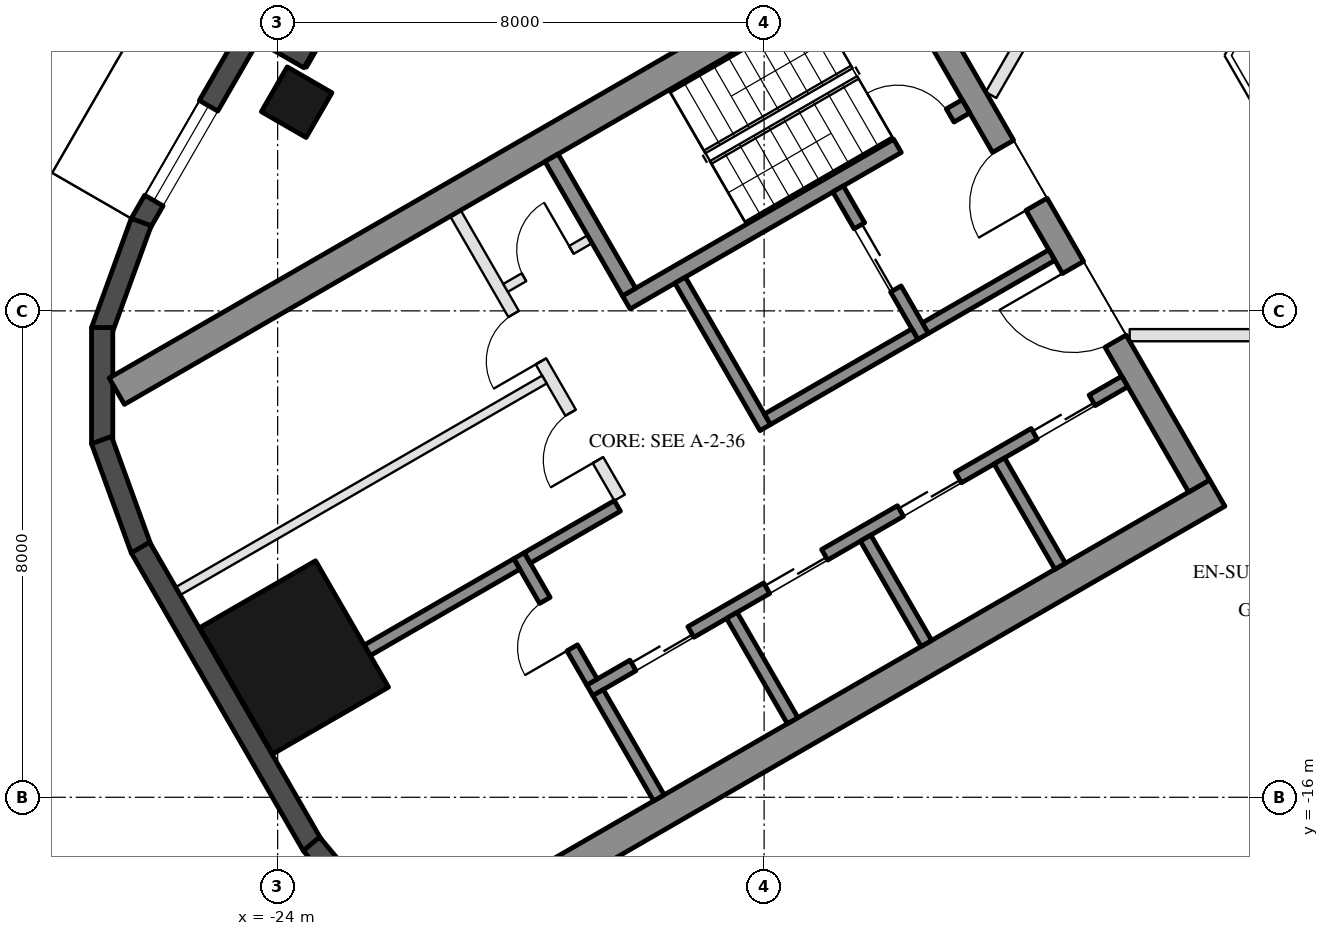
"""IFC4 building model, lengths in metres.
Left out: names, types, materials, properties, quantities, classifications, styles, units other than length and angle.
Written with IfcOpenShell. Run it as: python <this file> out.ifc"""

import sys

from ifc_helpers import new_model, si_unit, direction, frame, frame_2d, origin, origin_2d, place, context, subcontext, project, spatial, rectangle, hollow_rectangle, extrude, element, fill, save


model = new_model("IFC4")
c1 = context("Model", 3, precision=1e-05, world=origin(), true_north=direction((0.0, 1.0)))
c2 = subcontext(c1, "Body", "Model", "MODEL_VIEW")
j1 = project(units=[si_unit("LENGTHUNIT", "METRE"), si_unit("PLANEANGLEUNIT", "RADIAN")], contexts=[c1])
p1 = place(None, origin())
s1 = spatial("IfcSite", under=j1, at=p1, CompositionType="ELEMENT")
p2 = place(p1, origin())
s2 = spatial("IfcBuilding", under=s1, at=p2, CompositionType="ELEMENT")
p3 = place(p2, frame((0.0, 0.0, 157.7)))
s3 = spatial("IfcBuildingStorey", under=s2, at=p3, CompositionType="ELEMENT", Elevation=157.7)
p4 = place(p3, frame((-23.688, -4.568, 0.0), z_axis=(0.0, 0.0, 1.0), x_axis=(0.5, 0.866025403784, 0.0)))
e1 = element("IfcColumn", 1, at=p4, inside=s3, PredefinedType="COLUMN", context=c2, shape_type="SweptSolid", body=[
    extrude(hollow_rectangle(XDim=0.85, YDim=0.85, WallThickness=0.04, at=origin_2d()), origin(), (0.0, 0.0, 1.0), 3.7),
])
p5 = place(p3, frame((-23.729, -13.7, 0.0), z_axis=(0.0, 0.0, 1.0), x_axis=(-0.5, 0.866025403784, 0.0)))
e2 = element("IfcColumn", 2, at=p5, inside=s3, PredefinedType="COLUMN", context=c2, shape_type="SweptSolid", body=[
    extrude(hollow_rectangle(XDim=2.4, YDim=2.2, WallThickness=0.06, at=origin_2d()), origin(), (0.0, 0.0, 1.0), 3.7),
])
p6 = place(p3, frame((-20.309, 1.934, 0.0), z_axis=(0.0, 0.0, 1.0), x_axis=(-0.499992114976, -0.866029956157, 0.0)))
e3 = element("IfcWall", 3, at=p6, inside=s3, PredefinedType="SOLIDWALL", context=c2, shape_type="SweptSolid", body=[
    extrude(rectangle(XDim=6.74, YDim=0.35, at=frame_2d((3.37, 0.0))), origin(), (0.0, 0.0, 1.0), 3.55),
])
p7 = place(p6, frame((0.77, 0.0, 0.0)))
e4 = element("IfcOpeningElement", 4, at=p7, cuts=e3, PredefinedType="OPENING", context=c2, shape_type="SweptSolid", body=[
    extrude(rectangle(XDim=2.4, YDim=2.4, at=frame_2d((1.2, 1.2))), frame((0.0, 0.185, 0.0), z_axis=(0.0, -1.0, 0.0), x_axis=(1.0, 0.0, 0.0)), (0.0, 0.0, 1.0), 0.37),
])
p8 = place(p6, frame((3.47, 0.0, 0.3)))
e5 = element("IfcOpeningElement", 5, at=p8, cuts=e3, PredefinedType="OPENING", context=c2, shape_type="SweptSolid", body=[
    extrude(rectangle(XDim=2.9, YDim=2.65, at=frame_2d((1.45, 1.325))), frame((0.0, 0.185, 0.0), z_axis=(0.0, -1.0, 0.0), x_axis=(1.0, 0.0, 0.0)), (0.0, 0.0, 1.0), 0.37),
])
p9 = place(p3, frame((-23.481, -3.85, 0.0), z_axis=(0.0, 0.0, 1.0), x_axis=(-0.866092288191, 0.499884134912, 0.0)))
e6 = element("IfcWall", 6, at=p9, inside=s3, PredefinedType="SOLIDWALL", context=c2, shape_type="SweptSolid", body=[
    extrude(rectangle(XDim=1.22, YDim=0.35, at=frame_2d((0.61, 0.0))), origin(), (0.0, 0.0, 1.0), 3.55),
])
p10 = place(p3, frame((-24.299, -3.176, 0.0), z_axis=(0.0, 0.0, 1.0), x_axis=(-0.500028278809, -0.866009076391, 0.0)))
e7 = element("IfcWall", 7, at=p10, inside=s3, PredefinedType="SOLIDWALL", context=c2, shape_type="SweptSolid", body=[
    extrude(rectangle(XDim=3.916, YDim=0.35, at=frame_2d((1.958, 0.0))), origin(), (0.0, 0.0, 1.0), 3.55),
])
p11 = place(p10, frame((1.675, 0.0, 0.3)))
e8 = element("IfcOpeningElement", 8, at=p11, cuts=e7, PredefinedType="OPENING", context=c2, shape_type="SweptSolid", body=[
    extrude(rectangle(XDim=1.8, YDim=2.65, at=frame_2d((0.9, 1.325))), frame((0.0, 0.185, 0.0), z_axis=(0.0, -1.0, 0.0), x_axis=(1.0, 0.0, 0.0)), (0.0, 0.0, 1.0), 0.37),
])
for number, where, z_axis, x_axis in (
    (9, (-26.244, -6.54, 0.0), (0.0, 0.0, 1.0), (-0.342, -0.94, 0.0)),
    (10, (-26.886, -8.275, 0.0), (0.0, 0.0, 1.0), (0.0, -1.0, 0.0)),
    (11, (-26.897, -10.125, 0.0), (0.0, 0.0, 1.0), (0.342, -0.94, 0.0)),
):
    element("IfcWall", number, at=place(p3, frame(where, z_axis=z_axis, x_axis=x_axis)), inside=s3, PredefinedType="SOLIDWALL", context=c2, shape_type="SweptSolid", body=[
        extrude(rectangle(XDim=1.91, YDim=0.35, at=frame_2d((0.955, 0.0))), origin(), (0.0, 0.0, 1.0), 3.55),
    ])
p12 = place(p3, frame((-26.257, -11.893, 0.0), z_axis=(0.0, 0.0, 1.0), x_axis=(0.500018773155, -0.866014564827, 0.0)))
e12 = element("IfcWall", 12, at=p12, inside=s3, PredefinedType="SOLIDWALL", context=c2, shape_type="SweptSolid", body=[
    extrude(rectangle(XDim=5.658, YDim=0.35, at=frame_2d((2.829, 0.0))), origin(), (0.0, 0.0, 1.0), 3.55),
])
p13 = place(p3, frame((-23.445, -16.768, 0.0), z_axis=(0.0, 0.0, 1.0), x_axis=(0.642733291068, -0.76609001857, 0.0)))
e13 = element("IfcWall", 13, at=p13, inside=s3, PredefinedType="SOLIDWALL", context=c2, shape_type="SweptSolid", body=[
    extrude(rectangle(XDim=1.91, YDim=0.35, at=frame_2d((0.955, 0.0))), origin(), (0.0, 0.0, 1.0), 3.55),
])
for number, where, z_axis, x_axis in (
    (14, (-13.797, -1.903, 0.0), (0.0, 0.0, 1.0), (-0.866, -0.5, 0.0)),
    (15, (-8.547, -10.997, 0.0), (0.0, 0.0, 1.0), (-0.866, -0.5, 0.0)),
):
    element("IfcWall", number, at=place(p3, frame(where, z_axis=z_axis, x_axis=x_axis)), inside=s3, PredefinedType="SHEAR", context=c2, shape_type="SweptSolid", body=[
        extrude(rectangle(XDim=14.837, YDim=0.5, at=frame_2d((7.418, 0.0))), origin(), (0.0, 0.0, 1.0), 3.5),
    ])
p14 = place(p3, frame((-13.845, -2.22, 0.0), z_axis=(0.0, 0.0, 1.0), x_axis=(0.500004234368, -0.866022959057, 0.0)))
e16 = element("IfcWall", 16, at=p14, inside=s3, PredefinedType="SHEAR", context=c2, shape_type="SweptSolid", body=[
    extrude(rectangle(XDim=10.0, YDim=0.4, at=frame_2d((5.0, 0.0))), origin(), (0.0, 0.0, 1.0), 3.5),
])
p15 = place(p14, frame((3.55, 0.0, 0.0)))
e17 = element("IfcOpeningElement", 17, at=p15, cuts=e16, PredefinedType="OPENING", context=c2, shape_type="SweptSolid", body=[
    extrude(rectangle(XDim=1.1, YDim=2.1, at=frame_2d((0.55, 1.05))), frame((0.0, 0.21, 0.0), z_axis=(0.0, -1.0, 0.0), x_axis=(1.0, 0.0, 0.0)), (0.0, 0.0, 1.0), 0.42),
])
p16 = place(p14, frame((5.85, 0.0, 0.0)))
e18 = element("IfcOpeningElement", 18, at=p16, cuts=e16, PredefinedType="OPENING", context=c2, shape_type="SweptSolid", body=[
    extrude(rectangle(XDim=1.4, YDim=2.1, at=frame_2d((0.7, 1.05))), frame((0.0, 0.21, 0.0), z_axis=(0.0, -1.0, 0.0), x_axis=(1.0, 0.0, 0.0)), (0.0, 0.0, 1.0), 0.42),
])
p17 = place(p3, frame((-12.681, -4.636, 0.0), z_axis=(0.0, 0.0, 1.0), x_axis=(-0.866021702275, -0.500006411147, 0.0)))
e19 = element("IfcWall", 19, at=p17, inside=s3, PredefinedType="SHEAR", context=c2, shape_type="SweptSolid", body=[
    extrude(rectangle(XDim=6.45, YDim=0.25, at=frame_2d((3.225, 0.0))), origin(), (0.0, 0.0, 1.0), 3.5),
])
p18 = place(p17, frame((0.3, 0.0, 0.0)))
e20 = element("IfcOpeningElement", 20, at=p18, cuts=e19, PredefinedType="OPENING", context=c2, shape_type="SweptSolid", body=[
    extrude(rectangle(XDim=1.0, YDim=2.1, at=frame_2d((0.5, 1.05))), frame((0.0, 0.135, 0.0), z_axis=(0.0, -1.0, 0.0), x_axis=(1.0, 0.0, 0.0)), (0.0, 0.0, 1.0), 0.27),
])
p19 = place(p3, frame((-19.496, -5.482, 0.0), z_axis=(0.0, 0.0, 1.0), x_axis=(0.499990435942, -0.866030925526, 0.0)))
e21 = element("IfcWall", 21, at=p19, inside=s3, PredefinedType="SHEAR", context=c2, shape_type="SweptSolid", body=[
    extrude(rectangle(XDim=2.55, YDim=0.25, at=frame_2d((1.275, 0.0))), origin(), (0.0, 0.0, 1.0), 3.5),
])
p20 = place(p3, frame((-17.381, -7.495, 0.0), z_axis=(0.0, 0.0, 1.0), x_axis=(0.500011755427, -0.866018616679, 0.0)))
e22 = element("IfcWall", 22, at=p20, inside=s3, PredefinedType="SHEAR", context=c2, shape_type="SweptSolid", body=[
    extrude(rectangle(XDim=2.8, YDim=0.2, at=frame_2d((1.4, 0.0))), origin(), (0.0, 0.0, 1.0), 3.5),
])
p21 = place(p3, frame((-14.783, -5.995, 0.0), z_axis=(0.0, 0.0, 1.0), x_axis=(0.49994636267, -0.866056369097, 0.0)))
e23 = element("IfcWall", 23, at=p21, inside=s3, PredefinedType="SHEAR", context=c2, shape_type="SweptSolid", body=[
    extrude(rectangle(XDim=2.8, YDim=0.2, at=frame_2d((1.4, 0.0))), origin(), (0.0, 0.0, 1.0), 3.5),
])
p22 = place(p21, frame((0.7, 0.0, 0.0)))
e24 = element("IfcOpeningElement", 24, at=p22, cuts=e23, PredefinedType="OPENING", context=c2, shape_type="SweptSolid", body=[
    extrude(rectangle(XDim=1.2, YDim=2.1, at=frame_2d((0.6, 1.05))), frame((0.0, 0.11, 0.0), z_axis=(0.0, -1.0, 0.0), x_axis=(1.0, 0.0, 0.0)), (0.0, 0.0, 1.0), 0.22),
])
p23 = place(p3, frame((-13.52, -8.383, 0.0), z_axis=(0.0, 0.0, 1.0), x_axis=(-0.866034573852, -0.49998411664, 0.0)))
e25 = element("IfcWall", 25, at=p23, inside=s3, PredefinedType="SHEAR", context=c2, shape_type="SweptSolid", body=[
    extrude(rectangle(XDim=2.8, YDim=0.2, at=frame_2d((1.4, 0.0))), origin(), (0.0, 0.0, 1.0), 3.5),
])
p24 = place(p3, frame((-11.268, -7.083, 0.0), z_axis=(0.0, 0.0, 1.0), x_axis=(-0.866050077142, -0.499957262057, 0.0)))
e26 = element("IfcWall", 26, at=p24, inside=s3, PredefinedType="SHEAR", context=c2, shape_type="SweptSolid", body=[
    extrude(rectangle(XDim=2.4, YDim=0.2, at=frame_2d((1.2, 0.0))), origin(), (0.0, 0.0, 1.0), 3.5),
])
p25 = place(p3, frame((-10.068, -9.162, 0.0), z_axis=(0.0, 0.0, 1.0), x_axis=(-0.866032725843, -0.499987317609, 0.0)))
e27 = element("IfcWall", 27, at=p25, inside=s3, PredefinedType="SHEAR", context=c2, shape_type="SweptSolid", body=[
    extrude(rectangle(XDim=10.16, YDim=0.2, at=frame_2d((5.08, 0.0))), origin(), (0.0, 0.0, 1.0), 3.5),
])
p26 = place(p25, frame((0.62, 0.0, 0.0)))
e28 = element("IfcOpeningElement", 28, at=p26, cuts=e27, PredefinedType="OPENING", context=c2, shape_type="SweptSolid", body=[
    extrude(rectangle(XDim=1.1, YDim=2.1, at=frame_2d((0.55, 1.05))), frame((0.0, 0.11, 0.0), z_axis=(0.0, -1.0, 0.0), x_axis=(1.0, 0.0, 0.0)), (0.0, 0.0, 1.0), 0.22),
])
p27 = place(p25, frame((3.16, 0.0, 0.0)))
e29 = element("IfcOpeningElement", 29, at=p27, cuts=e27, PredefinedType="OPENING", context=c2, shape_type="SweptSolid", body=[
    extrude(rectangle(XDim=1.1, YDim=2.1, at=frame_2d((0.55, 1.05))), frame((0.0, 0.11, 0.0), z_axis=(0.0, -1.0, 0.0), x_axis=(1.0, 0.0, 0.0)), (0.0, 0.0, 1.0), 0.22),
])
p28 = place(p25, frame((5.7, 0.0, 0.0)))
e30 = element("IfcOpeningElement", 30, at=p28, cuts=e27, PredefinedType="OPENING", context=c2, shape_type="SweptSolid", body=[
    extrude(rectangle(XDim=1.1, YDim=2.1, at=frame_2d((0.55, 1.05))), frame((0.0, 0.11, 0.0), z_axis=(0.0, -1.0, 0.0), x_axis=(1.0, 0.0, 0.0)), (0.0, 0.0, 1.0), 0.22),
])
p29 = place(p25, frame((8.24, 0.0, 0.0)))
e31 = element("IfcOpeningElement", 31, at=p29, cuts=e27, PredefinedType="OPENING", context=c2, shape_type="SweptSolid", body=[
    extrude(rectangle(XDim=1.1, YDim=2.1, at=frame_2d((0.55, 1.05))), frame((0.0, 0.11, 0.0), z_axis=(0.0, -1.0, 0.0), x_axis=(1.0, 0.0, 0.0)), (0.0, 0.0, 1.0), 0.22),
])
p30 = place(p3, frame((-20.031, -12.026, 0.0), z_axis=(0.0, 0.0, 1.0), x_axis=(0.500033551112, -0.866006032174, 0.0)))
e32 = element("IfcWall", 32, at=p30, inside=s3, PredefinedType="SHEAR", context=c2, shape_type="SweptSolid", body=[
    extrude(rectangle(XDim=2.4, YDim=0.2, at=frame_2d((1.2, 0.0))), origin(), (0.0, 0.0, 1.0), 3.5),
])
p31 = place(p30, frame((0.85, 0.0, 0.0)))
e33 = element("IfcOpeningElement", 33, at=p31, cuts=e32, PredefinedType="OPENING", context=c2, shape_type="SweptSolid", body=[
    extrude(rectangle(XDim=0.9, YDim=2.1, at=frame_2d((0.45, 1.05))), frame((0.0, 0.11, 0.0), z_axis=(0.0, -1.0, 0.0), x_axis=(1.0, 0.0, 0.0)), (0.0, 0.0, 1.0), 0.22),
])
p32 = place(p3, frame((-18.413, -11.208, 0.0), z_axis=(0.0, 0.0, 1.0), x_axis=(-0.866038183914, -0.499977863513, 0.0)))
e34 = element("IfcWall", 34, at=p32, inside=s3, PredefinedType="SHEAR", context=c2, shape_type="SweptSolid", body=[
    extrude(rectangle(XDim=1.71, YDim=0.2, at=frame_2d((0.855, 0.0))), origin(), (0.0, 0.0, 1.0), 3.5),
])
for number, where, z_axis, x_axis in (
    (35, (-12.131, -10.468, 0.0), (0.0, 0.0, 1.0), (0.5, -0.866, 0.0)),
    (36, (-14.331, -11.738, 0.0), (0.0, 0.0, 1.0), (0.5, -0.866, 0.0)),
    (37, (-16.531, -13.008, 0.0), (0.0, 0.0, 1.0), (0.5, -0.866, 0.0)),
    (38, (-18.73, -14.278, 0.0), (0.0, 0.0, 1.0), (0.5, -0.866, 0.0)),
):
    element("IfcWall", number, at=place(p3, frame(where, z_axis=z_axis, x_axis=x_axis)), inside=s3, PredefinedType="SHEAR", context=c2, shape_type="SweptSolid", body=[
        extrude(rectangle(XDim=2.0, YDim=0.2, at=frame_2d((1.0, 0.0))), origin(), (0.0, 0.0, 1.0), 3.5),
    ])
p33 = place(p3, frame((-20.067, -12.163, 0.0), z_axis=(0.0, 0.0, 1.0), x_axis=(-0.866055327414, -0.49994816717, 0.0)))
e39 = element("IfcWall", 39, at=p33, inside=s3, PredefinedType="SHEAR", context=c2, shape_type="SweptSolid", body=[
    extrude(rectangle(XDim=2.84, YDim=0.2, at=frame_2d((1.42, 0.0))), origin(), (0.0, 0.0, 1.0), 3.5),
])
p34 = place(p3, frame((-21.076, -6.395, 0.0), z_axis=(0.0, 0.0, 1.0), x_axis=(0.50001468107, -0.866016927499, 0.0)))
e40 = element("IfcWall", 40, at=p34, inside=s3, PredefinedType="PARTITIONING", context=c2, shape_type="SweptSolid", body=[
    extrude(rectangle(XDim=5.4, YDim=0.2, at=frame_2d((2.7, 0.0))), origin(), (0.0, 0.0, 1.0), 3.5),
])
p35 = place(p34, frame((1.913, 0.0, 0.0)))
e41 = element("IfcOpeningElement", 41, at=p35, cuts=e40, PredefinedType="OPENING", context=c2, shape_type="SweptSolid", body=[
    extrude(rectangle(XDim=0.9, YDim=2.1, at=frame_2d((0.45, 1.05))), frame((0.0, 0.11, 0.0), z_axis=(0.0, -1.0, 0.0), x_axis=(1.0, 0.0, 0.0)), (0.0, 0.0, 1.0), 0.22),
])
p36 = place(p34, frame((3.788, 0.0, 0.0)))
e42 = element("IfcOpeningElement", 42, at=p36, cuts=e40, PredefinedType="OPENING", context=c2, shape_type="SweptSolid", body=[
    extrude(rectangle(XDim=0.9, YDim=2.1, at=frame_2d((0.45, 1.05))), frame((0.0, 0.11, 0.0), z_axis=(0.0, -1.0, 0.0), x_axis=(1.0, 0.0, 0.0)), (0.0, 0.0, 1.0), 0.22),
])
p37 = place(p3, frame((-18.866, -6.822, 0.0), z_axis=(0.0, 0.0, 1.0), x_axis=(-0.866028054938, -0.499995408039, 0.0)))
e43 = element("IfcWall", 43, at=p37, inside=s3, PredefinedType="PARTITIONING", context=c2, shape_type="SweptSolid", body=[
    extrude(rectangle(XDim=1.6, YDim=0.15, at=frame_2d((0.8, 0.0))), origin(), (0.0, 0.0, 1.0), 3.5),
])
p38 = place(p37, frame((0.35, 0.0, 0.0)))
e44 = element("IfcOpeningElement", 44, at=p38, cuts=e43, PredefinedType="OPENING", context=c2, shape_type="SweptSolid", body=[
    extrude(rectangle(XDim=0.9, YDim=2.1, at=frame_2d((0.45, 1.05))), frame((0.0, 0.085, 0.0), z_axis=(0.0, -1.0, 0.0), x_axis=(1.0, 0.0, 0.0)), (0.0, 0.0, 1.0), 0.17),
])
p39 = place(p3, frame((-19.613, -9.13, 0.0), z_axis=(0.0, 0.0, 1.0), x_axis=(-0.866031734426, -0.499989034847, 0.0)))
e45 = element("IfcWall", 45, at=p39, inside=s3, PredefinedType="PARTITIONING", context=c2, shape_type="SweptSolid", body=[
    extrude(rectangle(XDim=6.95, YDim=0.15, at=frame_2d((3.475, 0.0))), origin(), (0.0, 0.0, 1.0), 3.5),
])
p40 = place(p3, frame((-4.7, -8.4, 0.0), z_axis=(0.0, 0.0, 1.0), x_axis=(-1.0, 0.0, 0.0)))
e46 = element("IfcWall", 46, at=p40, inside=s3, PredefinedType="PARTITIONING", context=c2, shape_type="SweptSolid", body=[
    extrude(rectangle(XDim=5.288, YDim=0.2, at=frame_2d((2.644, 0.0))), origin(), (0.0, 0.0, 1.0), 2.95),
])
p41 = place(p40, frame((2.144, 0.0, 0.0)))
e47 = element("IfcOpeningElement", 47, at=p41, cuts=e46, PredefinedType="OPENING", context=c2, shape_type="SweptSolid", body=[
    extrude(rectangle(XDim=1.0, YDim=2.1, at=frame_2d((0.5, 1.05))), frame((0.0, 0.11, 0.0), z_axis=(0.0, -1.0, 0.0), x_axis=(1.0, 0.0, 0.0)), (0.0, 0.0, 1.0), 0.22),
])
p42 = place(p3, frame((-12.269, -4.45, 0.0), z_axis=(0.0, 0.0, 1.0), x_axis=(0.500011931275, 0.86601851515, 0.0)))
e48 = element("IfcWall", 48, at=p42, inside=s3, PredefinedType="PARTITIONING", context=c2, shape_type="SweptSolid", body=[
    extrude(rectangle(XDim=4.088, YDim=0.2, at=frame_2d((2.044, 0.0))), origin(), (0.0, 0.0, 1.0), 2.95),
])
p43 = place(p42, frame((1.544, 0.0, 0.0)))
e49 = element("IfcOpeningElement", 49, at=p43, cuts=e48, PredefinedType="OPENING", context=c2, shape_type="SweptSolid", body=[
    extrude(rectangle(XDim=1.0, YDim=2.1, at=frame_2d((0.5, 1.05))), frame((0.0, 0.11, 0.0), z_axis=(0.0, -1.0, 0.0), x_axis=(1.0, 0.0, 0.0)), (0.0, 0.0, 1.0), 0.22),
])
p44 = place(p11, origin())
e50 = element("IfcWindow", 50, at=p44, inside=s3, PartitioningType="SINGLE_PANEL", PredefinedType="WINDOW", context=c2, shape_type="SweptSolid", body=[
    extrude(rectangle(XDim=1.8, YDim=2.65, at=frame_2d((0.9, 1.325))), frame((0.0, 0.03, 0.0), z_axis=(0.0, -1.0, 0.0), x_axis=(1.0, 0.0, 0.0)), (0.0, 0.0, 1.0), 0.06),
])
fill(e8, e50)
p45 = place(p22, origin())
e51 = element("IfcDoor", 51, at=p45, inside=s3, OperationType="DOUBLE_DOOR_SLIDING", PredefinedType="DOOR", context=c2, shape_type="SweptSolid", body=[
    extrude(rectangle(XDim=1.2, YDim=2.1, at=frame_2d((0.6, 1.05))), frame((0.0, 0.025, 0.0), z_axis=(0.0, -1.0, 0.0), x_axis=(1.0, 0.0, 0.0)), (0.0, 0.0, 1.0), 0.05),
])
fill(e24, e51)
p46 = place(p38, frame((0.9, 0.0, 0.0), z_axis=(0.0, 0.0, 1.0), x_axis=(-1.0, 0.0, 0.0)))
e52 = element("IfcDoor", 52, at=p46, inside=s3, OperationType="SINGLE_SWING_RIGHT", PredefinedType="DOOR", context=c2, shape_type="SweptSolid", body=[
    extrude(rectangle(XDim=0.9, YDim=2.1, at=frame_2d((0.45, 1.05))), frame((0.0, 0.025, 0.0), z_axis=(0.0, -1.0, 0.0), x_axis=(1.0, 0.0, 0.0)), (0.0, 0.0, 1.0), 0.05),
])
fill(e44, e52)
p47 = place(p26, origin())
e53 = element("IfcDoor", 53, at=p47, inside=s3, OperationType="DOUBLE_DOOR_SLIDING", PredefinedType="DOOR", context=c2, shape_type="SweptSolid", body=[
    extrude(rectangle(XDim=1.1, YDim=2.1, at=frame_2d((0.55, 1.05))), frame((0.0, 0.025, 0.0), z_axis=(0.0, -1.0, 0.0), x_axis=(1.0, 0.0, 0.0)), (0.0, 0.0, 1.0), 0.05),
])
fill(e28, e53)
p48 = place(p27, origin())
e54 = element("IfcDoor", 54, at=p48, inside=s3, OperationType="DOUBLE_DOOR_SLIDING", PredefinedType="DOOR", context=c2, shape_type="SweptSolid", body=[
    extrude(rectangle(XDim=1.1, YDim=2.1, at=frame_2d((0.55, 1.05))), frame((0.0, 0.025, 0.0), z_axis=(0.0, -1.0, 0.0), x_axis=(1.0, 0.0, 0.0)), (0.0, 0.0, 1.0), 0.05),
])
fill(e29, e54)
p49 = place(p28, origin())
e55 = element("IfcDoor", 55, at=p49, inside=s3, OperationType="DOUBLE_DOOR_SLIDING", PredefinedType="DOOR", context=c2, shape_type="SweptSolid", body=[
    extrude(rectangle(XDim=1.1, YDim=2.1, at=frame_2d((0.55, 1.05))), frame((0.0, 0.025, 0.0), z_axis=(0.0, -1.0, 0.0), x_axis=(1.0, 0.0, 0.0)), (0.0, 0.0, 1.0), 0.05),
])
fill(e30, e55)
p50 = place(p29, origin())
e56 = element("IfcDoor", 56, at=p50, inside=s3, OperationType="DOUBLE_DOOR_SLIDING", PredefinedType="DOOR", context=c2, shape_type="SweptSolid", body=[
    extrude(rectangle(XDim=1.1, YDim=2.1, at=frame_2d((0.55, 1.05))), frame((0.0, 0.025, 0.0), z_axis=(0.0, -1.0, 0.0), x_axis=(1.0, 0.0, 0.0)), (0.0, 0.0, 1.0), 0.05),
])
fill(e31, e56)
p51 = place(p31, frame((0.9, 0.0, 0.0), z_axis=(0.0, 0.0, 1.0), x_axis=(-1.0, 0.0, 0.0)))
e57 = element("IfcDoor", 57, at=p51, inside=s3, OperationType="SINGLE_SWING_LEFT", PredefinedType="DOOR", context=c2, shape_type="SweptSolid", body=[
    extrude(rectangle(XDim=0.9, YDim=2.1, at=frame_2d((0.45, 1.05))), frame((0.0, 0.025, 0.0), z_axis=(0.0, -1.0, 0.0), x_axis=(1.0, 0.0, 0.0)), (0.0, 0.0, 1.0), 0.05),
])
fill(e33, e57)
p52 = place(p35, frame((0.9, 0.0, 0.0), z_axis=(0.0, 0.0, 1.0), x_axis=(-1.0, 0.0, 0.0)))
e58 = element("IfcDoor", 58, at=p52, inside=s3, OperationType="SINGLE_SWING_LEFT", PredefinedType="DOOR", context=c2, shape_type="SweptSolid", body=[
    extrude(rectangle(XDim=0.9, YDim=2.1, at=frame_2d((0.45, 1.05))), frame((0.0, 0.025, 0.0), z_axis=(0.0, -1.0, 0.0), x_axis=(1.0, 0.0, 0.0)), (0.0, 0.0, 1.0), 0.05),
])
fill(e41, e58)
p53 = place(p36, frame((0.9, 0.0, 0.0), z_axis=(0.0, 0.0, 1.0), x_axis=(-1.0, 0.0, 0.0)))
e59 = element("IfcDoor", 59, at=p53, inside=s3, OperationType="SINGLE_SWING_LEFT", PredefinedType="DOOR", context=c2, shape_type="SweptSolid", body=[
    extrude(rectangle(XDim=0.9, YDim=2.1, at=frame_2d((0.45, 1.05))), frame((0.0, 0.025, 0.0), z_axis=(0.0, -1.0, 0.0), x_axis=(1.0, 0.0, 0.0)), (0.0, 0.0, 1.0), 0.05),
])
fill(e42, e59)
p54 = place(p15, frame((1.1, 0.0, 0.0), z_axis=(0.0, 0.0, 1.0), x_axis=(-1.0, 0.0, 0.0)))
e60 = element("IfcDoor", 60, at=p54, inside=s3, OperationType="SINGLE_SWING_LEFT", PredefinedType="DOOR", context=c2, shape_type="SweptSolid", body=[
    extrude(rectangle(XDim=1.1, YDim=2.1, at=frame_2d((0.55, 1.05))), frame((0.0, 0.025, 0.0), z_axis=(0.0, -1.0, 0.0), x_axis=(1.0, 0.0, 0.0)), (0.0, 0.0, 1.0), 0.05),
])
fill(e17, e60)
p55 = place(p16, frame((1.4, 0.0, 0.0), z_axis=(0.0, 0.0, 1.0), x_axis=(-1.0, 0.0, 0.0)))
e61 = element("IfcDoor", 61, at=p55, inside=s3, OperationType="DOUBLE_DOOR_SINGLE_SWING", PredefinedType="DOOR", context=c2, shape_type="SweptSolid", body=[
    extrude(rectangle(XDim=1.4, YDim=2.1, at=frame_2d((0.7, 1.05))), frame((0.0, 0.025, 0.0), z_axis=(0.0, -1.0, 0.0), x_axis=(1.0, 0.0, 0.0)), (0.0, 0.0, 1.0), 0.05),
])
fill(e18, e61)
p56 = place(p18, frame((1.0, 0.0, 0.0), z_axis=(0.0, 0.0, 1.0), x_axis=(-1.0, 0.0, 0.0)))
e62 = element("IfcDoor", 62, at=p56, inside=s3, OperationType="SINGLE_SWING_LEFT", PredefinedType="DOOR", context=c2, shape_type="SweptSolid", body=[
    extrude(rectangle(XDim=1.0, YDim=2.1, at=frame_2d((0.5, 1.05))), frame((0.0, 0.025, 0.0), z_axis=(0.0, -1.0, 0.0), x_axis=(1.0, 0.0, 0.0)), (0.0, 0.0, 1.0), 0.05),
])
fill(e20, e62)
save(model, sys.argv[1])
